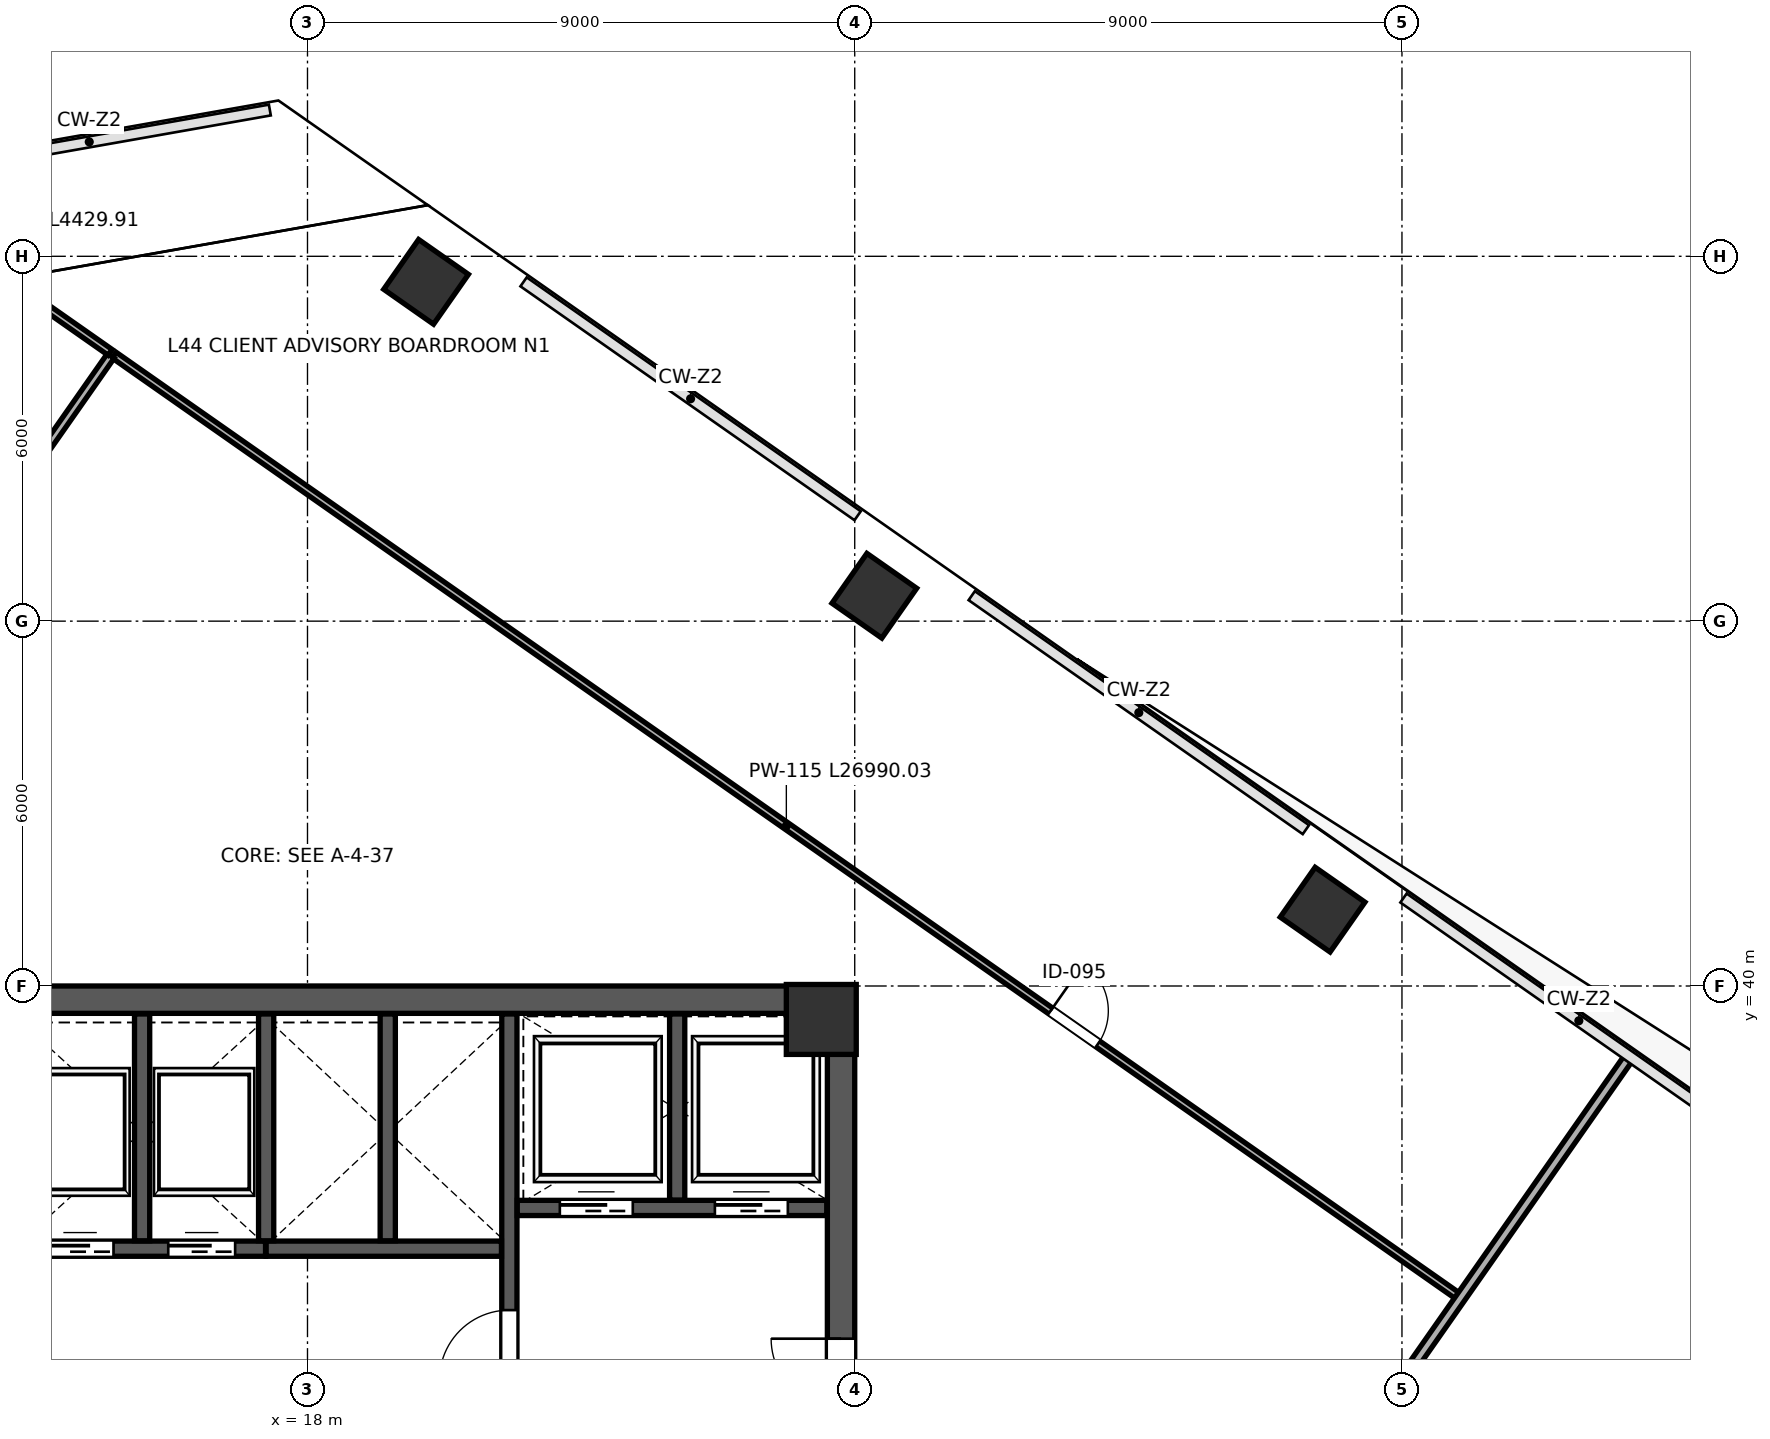
"""IFC4 building model, lengths in metres.
Left out: names, types, materials, properties, quantities, classifications, styles, units other than length and angle.
Written with IfcOpenShell. Run it as: python <this file> out.ifc"""

import sys

from ifc_helpers import new_model, si_unit, direction, frame, frame_2d, origin, origin_2d, place, context, subcontext, project, spatial, rectangle, extrude, clip, halfspace, source, transform, mapped, element, fill, save


model = new_model("IFC4")
c1 = context("Model", 3, precision=1e-05, world=origin(), true_north=direction((0.0, 1.0)))
c2 = subcontext(c1, "Body", "Model", "MODEL_VIEW")
j1 = project(units=[si_unit("LENGTHUNIT", "METRE"), si_unit("PLANEANGLEUNIT", "RADIAN")], contexts=[c1])
p1 = place(None, origin())
s1 = spatial("IfcSite", under=j1, at=p1, CompositionType="ELEMENT")
p2 = place(p1, origin())
s2 = spatial("IfcBuilding", under=s1, at=p2, CompositionType="ELEMENT")
p3 = place(p2, frame((0.0, 0.0, 196.0)))
s3 = spatial("IfcBuildingStorey", under=s2, at=p3, CompositionType="ELEMENT", Elevation=196.0)
m1 = source(origin(), c2, "Body", "SweptSolid", [
    extrude(rectangle(XDim=1.15, YDim=1.15, at=origin_2d()), origin(), (0.0, 0.0, 1.0), 4.198),
])
p4 = place(p3, frame((26.45, 39.45, 0.001), z_axis=(0.0, 0.0, 1.0), x_axis=(1.0, 0.0, 0.0)))
e1 = element("IfcColumn", 1, at=p4, inside=s3, PredefinedType="COLUMN", context=c2, shape_type="MappedRepresentation", body=[
    mapped(m1, transform((0.0, 0.0, 0.0), scale=1.0)),
])
p5 = place(p3, frame((19.95, 51.58, 0.0), z_axis=(0.101258987267, 0.006881678746, 0.994836298089), x_axis=(-0.513759043576, -0.855957245093, 0.058213741642)))
e2 = element("IfcColumn", 2, at=p5, inside=s3, PredefinedType="COLUMN", context=c2, shape_type="Clipping", body=[
    clip(clip(extrude(rectangle(XDim=1.0, YDim=1.0, at=origin_2d()), origin(), (0.0, 0.0, 1.0), 4.222), halfspace(frame((0.0, 0.0, 0.072), z_axis=(0.0, 0.0, -1.0), x_axis=(1.0, 0.0, 0.0)), False)), halfspace(frame((0.0, 0.0, 4.15), z_axis=(0.0, 0.0, 1.0), x_axis=(1.0, 0.0, 0.0)), False)),
])
p6 = place(p3, frame((27.323, 46.418, 0.0), z_axis=(0.074280101089, -0.030998326117, 0.996755521861), x_axis=(-0.84309265883, -0.535783006939, 0.04616641748)))
e3 = element("IfcColumn", 3, at=p6, inside=s3, PredefinedType="COLUMN", context=c2, shape_type="Clipping", body=[
    clip(clip(extrude(rectangle(XDim=1.0, YDim=1.0, at=origin_2d()), origin(), (0.0, 0.0, 1.0), 4.214), halfspace(frame((0.0, 0.0, 0.057), z_axis=(0.0, 0.0, -1.0), x_axis=(1.0, 0.0, 0.0)), False)), halfspace(frame((0.0, 0.0, 4.157), z_axis=(0.0, 0.0, 1.0), x_axis=(1.0, 0.0, 0.0)), False)),
])
p7 = place(p3, frame((34.695, 41.256, 0.0), z_axis=(0.047152209171, -0.068874664255, 0.996510386195), x_axis=(-0.998813718494, 0.008891928964, 0.047875769947)))
e4 = element("IfcColumn", 4, at=p7, inside=s3, PredefinedType="COLUMN", context=c2, shape_type="Clipping", body=[
    clip(clip(extrude(rectangle(XDim=1.0, YDim=1.0, at=origin_2d()), origin(), (0.0, 0.0, 1.0), 4.215), halfspace(frame((0.0, 0.0, 0.059), z_axis=(0.0, 0.0, -1.0), x_axis=(1.0, 0.0, 0.0)), False)), halfspace(frame((0.0, 0.0, 4.156), z_axis=(0.0, 0.0, 1.0), x_axis=(1.0, 0.0, 0.0)), False)),
])
p8 = place(p3, frame((26.775, 24.45, 0.0), z_axis=(0.0, 0.0, 1.0), x_axis=(0.0, 1.0, 0.0)))
e5 = element("IfcWall", 5, at=p8, inside=s3, PredefinedType="SHEAR", context=c2, shape_type="SweptSolid", body=[
    extrude(rectangle(XDim=15.1, YDim=0.45, at=frame_2d((7.55, 0.0))), origin(), (0.0, 0.0, 1.0), 3.96),
])
p9 = place(p8, frame((8.6, 0.0, 0.0)))
e6 = element("IfcOpeningElement", 6, at=p9, cuts=e5, PredefinedType="OPENING", context=c2, shape_type="SweptSolid", body=[
    extrude(rectangle(XDim=1.15, YDim=2.2, at=frame_2d((0.575, 1.1))), frame((0.0, 0.235, 0.0), z_axis=(0.0, -1.0, 0.0), x_axis=(1.0, 0.0, 0.0)), (0.0, 0.0, 1.0), 0.47),
])
p10 = place(p3, frame((9.0, 39.775, 0.0), z_axis=(0.0, 0.0, 1.0), x_axis=(1.0, 0.0, 0.0)))
e7 = element("IfcWall", 7, at=p10, inside=s3, PredefinedType="SHEAR", context=c2, shape_type="SweptSolid", body=[
    extrude(rectangle(XDim=18.0, YDim=0.45, at=frame_2d((9.0, 0.0))), origin(), (0.0, 0.0, 1.0), 3.96),
])
p11 = place(p3, frame((21.32, 32.12, 0.0), z_axis=(0.0, 0.0, 1.0), x_axis=(0.0, 1.0, 0.0)))
e8 = element("IfcWall", 8, at=p11, inside=s3, PredefinedType="SHEAR", context=c2, shape_type="SweptSolid", body=[
    extrude(rectangle(XDim=7.42, YDim=0.25, at=frame_2d((3.71, 0.0))), origin(), (0.0, 0.0, 1.0), 3.96),
])
p12 = place(p11, frame((1.4, 0.0, 0.0)))
e9 = element("IfcOpeningElement", 9, at=p12, cuts=e8, PredefinedType="OPENING", context=c2, shape_type="SweptSolid", body=[
    extrude(rectangle(XDim=1.15, YDim=2.2, at=frame_2d((0.575, 1.1))), frame((0.0, 0.135, 0.0), z_axis=(0.0, -1.0, 0.0), x_axis=(1.0, 0.0, 0.0)), (0.0, 0.0, 1.0), 0.27),
])
p13 = place(p3, frame((21.45, 36.35, 0.0), z_axis=(0.0, 0.0, 1.0), x_axis=(1.0, 0.0, 0.0)))
e10 = element("IfcWall", 10, at=p13, inside=s3, PredefinedType="SHEAR", context=c2, shape_type="SweptSolid", body=[
    extrude(rectangle(XDim=5.09, YDim=0.25, at=frame_2d((2.545, 0.0))), origin(), (0.0, 0.0, 1.0), 3.96),
])
p14 = place(p13, frame((0.7, 0.0, 0.0)))
e11 = element("IfcOpeningElement", 11, at=p14, cuts=e10, PredefinedType="OPENING", context=c2, shape_type="SweptSolid", body=[
    extrude(rectangle(XDim=1.2, YDim=2.2, at=frame_2d((0.6, 1.1))), frame((0.0, 0.135, 0.0), z_axis=(0.0, -1.0, 0.0), x_axis=(1.0, 0.0, 0.0)), (0.0, 0.0, 1.0), 0.27),
])
p15 = place(p13, frame((3.25, 0.0, 0.0)))
e12 = element("IfcOpeningElement", 12, at=p15, cuts=e10, PredefinedType="OPENING", context=c2, shape_type="SweptSolid", body=[
    extrude(rectangle(XDim=1.2, YDim=2.2, at=frame_2d((0.6, 1.1))), frame((0.0, 0.135, 0.0), z_axis=(0.0, -1.0, 0.0), x_axis=(1.0, 0.0, 0.0)), (0.0, 0.0, 1.0), 0.27),
])
p16 = place(p3, frame((24.08, 36.48, 0.0), z_axis=(0.0, 0.0, 1.0), x_axis=(0.0, 1.0, 0.0)))
e13 = element("IfcWall", 13, at=p16, inside=s3, PredefinedType="SHEAR", context=c2, shape_type="SweptSolid", body=[
    extrude(rectangle(XDim=3.06, YDim=0.25, at=frame_2d((1.53, 0.0))), origin(), (0.0, 0.0, 1.0), 3.96),
])
p17 = place(p3, frame((13.06, 35.68, 0.0), z_axis=(0.0, 0.0, 1.0), x_axis=(1.0, 0.0, 0.0)))
e14 = element("IfcWall", 14, at=p17, inside=s3, PredefinedType="SHEAR", context=c2, shape_type="SweptSolid", body=[
    extrude(rectangle(XDim=4.25, YDim=0.25, at=frame_2d((2.125, 0.0))), origin(), (0.0, 0.0, 1.0), 3.96),
])
p18 = place(p17, frame((0.65, 0.0, 0.0)))
e15 = element("IfcOpeningElement", 15, at=p18, cuts=e14, PredefinedType="OPENING", context=c2, shape_type="SweptSolid", body=[
    extrude(rectangle(XDim=1.1, YDim=2.2, at=frame_2d((0.55, 1.1))), frame((0.0, 0.135, 0.0), z_axis=(0.0, -1.0, 0.0), x_axis=(1.0, 0.0, 0.0)), (0.0, 0.0, 1.0), 0.27),
])
p19 = place(p17, frame((2.65, 0.0, 0.0)))
e16 = element("IfcOpeningElement", 16, at=p19, cuts=e14, PredefinedType="OPENING", context=c2, shape_type="SweptSolid", body=[
    extrude(rectangle(XDim=1.1, YDim=2.2, at=frame_2d((0.55, 1.1))), frame((0.0, 0.135, 0.0), z_axis=(0.0, -1.0, 0.0), x_axis=(1.0, 0.0, 0.0)), (0.0, 0.0, 1.0), 0.27),
])
p20 = place(p3, frame((15.28, 35.81, 0.0), z_axis=(0.0, 0.0, 1.0), x_axis=(0.0, 1.0, 0.0)))
e17 = element("IfcWall", 17, at=p20, inside=s3, PredefinedType="SHEAR", context=c2, shape_type="SweptSolid", body=[
    extrude(rectangle(XDim=3.73, YDim=0.25, at=frame_2d((1.865, 0.0))), origin(), (0.0, 0.0, 1.0), 3.96),
])
p21 = place(p3, frame((17.32, 35.68, 0.0), z_axis=(0.0, 0.0, 1.0), x_axis=(1.0, 0.0, 0.0)))
e18 = element("IfcWall", 18, at=p21, inside=s3, PredefinedType="SHEAR", context=c2, shape_type="SweptSolid", body=[
    extrude(rectangle(XDim=3.87, YDim=0.25, at=frame_2d((1.935, 0.0))), origin(), (0.0, 0.0, 1.0), 3.96),
])
for number, where, z_axis, x_axis in (
    (19, (17.32, 35.81, 0.0), (0.0, 0.0, 1.0), (0.0, 1.0, 0.0)),
    (20, (19.32, 35.81, 0.0), (0.0, 0.0, 1.0), (0.0, 1.0, 0.0)),
):
    element("IfcWall", number, at=place(p3, frame(where, z_axis=z_axis, x_axis=x_axis)), inside=s3, PredefinedType="SHEAR", context=c2, shape_type="SweptSolid", body=[
        extrude(rectangle(XDim=3.73, YDim=0.25, at=frame_2d((1.865, 0.0))), origin(), (0.0, 0.0, 1.0), 3.96),
    ])
p22 = place(p3, frame((14.821, 50.374, 0.0), z_axis=(0.0, 0.0, 1.0), x_axis=(0.819153719849, -0.573574043396, 0.0)))
e21 = element("IfcWall", 21, at=p22, inside=s3, PredefinedType="PARTITIONING", context=c2, shape_type="SweptSolid", body=[
    extrude(rectangle(XDim=26.99, YDim=0.115, at=frame_2d((13.495, 0.0))), origin(), (0.0, 0.0, 1.0), 3.96),
])
p23 = place(p22, frame((18.8, 0.0, 0.0)))
e22 = element("IfcOpeningElement", 22, at=p23, cuts=e21, PredefinedType="OPENING", context=c2, shape_type="SweptSolid", body=[
    extrude(rectangle(XDim=0.95, YDim=2.15, at=frame_2d((0.475, 1.075))), frame((0.0, 0.067, 0.0), z_axis=(0.0, -1.0, 0.0), x_axis=(1.0, 0.0, 0.0)), (0.0, 0.0, 1.0), 0.135),
])
p24 = place(p3, frame((1.189, 30.975, 0.0), z_axis=(0.0, 0.0, 1.0), x_axis=(0.573571020786, 0.819155836282, 0.0)))
e23 = element("IfcWall", 23, at=p24, inside=s3, PredefinedType="PARTITIONING", context=c2, shape_type="SweptSolid", body=[
    extrude(rectangle(XDim=23.67, YDim=0.135, at=frame_2d((11.835, 0.0))), origin(), (0.0, 0.0, 1.0), 3.96),
])
p25 = place(p24, frame((6.6, 0.0, 0.0)))
e24 = element("IfcOpeningElement", 24, at=p25, cuts=e23, PredefinedType="OPENING", context=c2, shape_type="SweptSolid", body=[
    extrude(rectangle(XDim=0.95, YDim=2.15, at=frame_2d((0.475, 1.075))), frame((0.0, 0.078, 0.0), z_axis=(0.0, -1.0, 0.0), x_axis=(1.0, 0.0, 0.0)), (0.0, 0.0, 1.0), 0.155),
])
p26 = place(p3, frame((11.127, 52.961, 0.0), z_axis=(0.0, 0.0, 1.0), x_axis=(0.819130930641, -0.573606588584, 0.0)))
e25 = element("IfcWall", 25, at=p26, inside=s3, PredefinedType="PARTITIONING", context=c2, shape_type="SweptSolid", body=[
    extrude(rectangle(XDim=4.43, YDim=0.115, at=frame_2d((2.215, 0.0))), origin(), (0.0, 0.0, 1.0), 3.96),
])
p27 = place(p3, frame((28.336, 22.55, 0.0), z_axis=(0.0, 0.0, 1.0), x_axis=(0.573581263398, 0.819148664333, 0.0)))
e26 = element("IfcWall", 26, at=p27, inside=s3, PredefinedType="PARTITIONING", context=c2, shape_type="SweptSolid", body=[
    extrude(rectangle(XDim=19.84, YDim=0.16, at=frame_2d((9.92, 0.0))), origin(), (0.0, 0.0, 1.0), 3.195),
])
m2 = source(origin(), c2, "Body", "SweptSolid", [
    extrude(rectangle(XDim=1.15, YDim=2.2, at=frame_2d((0.575, 1.1))), frame((0.0, 0.025, 0.0), z_axis=(0.0, -1.0, 0.0), x_axis=(1.0, 0.0, 0.0)), (0.0, 0.0, 1.0), 0.05),
])
p28 = place(p12, origin())
e27 = element("IfcDoor", 27, at=p28, inside=s3, OperationType="SINGLE_SWING_LEFT", PredefinedType="DOOR", context=c2, shape_type="MappedRepresentation", body=[
    mapped(m2, transform((0.0, 0.0, 0.0), scale=1.0)),
])
fill(e9, e27)
p29 = place(p9, origin())
e28 = element("IfcDoor", 28, at=p29, inside=s3, OperationType="SINGLE_SWING_RIGHT", PredefinedType="DOOR", context=c2, shape_type="MappedRepresentation", body=[
    mapped(m2, transform((0.0, 0.0, 0.0), scale=1.0)),
])
fill(e6, e28)
m3 = source(origin(), c2, "Body", "SweptSolid", [
    extrude(rectangle(XDim=1.1, YDim=2.2, at=frame_2d((0.55, 1.1))), frame((0.0, 0.025, 0.0), z_axis=(0.0, -1.0, 0.0), x_axis=(1.0, 0.0, 0.0)), (0.0, 0.0, 1.0), 0.05),
])
p30 = place(p18, origin())
e29 = element("IfcDoor", 29, at=p30, inside=s3, OperationType="SLIDING_TO_LEFT", PredefinedType="DOOR", context=c2, shape_type="MappedRepresentation", body=[
    mapped(m3, transform((0.0, 0.0, 0.0), scale=1.0)),
])
fill(e15, e29)
p31 = place(p19, origin())
e30 = element("IfcDoor", 30, at=p31, inside=s3, OperationType="SLIDING_TO_RIGHT", PredefinedType="DOOR", context=c2, shape_type="MappedRepresentation", body=[
    mapped(m3, transform((0.0, 0.0, 0.0), scale=1.0)),
])
fill(e16, e30)
m4 = source(origin(), c2, "Body", "SweptSolid", [
    extrude(rectangle(XDim=1.2, YDim=2.2, at=frame_2d((0.6, 1.1))), frame((0.0, 0.025, 0.0), z_axis=(0.0, -1.0, 0.0), x_axis=(1.0, 0.0, 0.0)), (0.0, 0.0, 1.0), 0.05),
])
p32 = place(p14, origin())
e31 = element("IfcDoor", 31, at=p32, inside=s3, OperationType="SLIDING_TO_LEFT", PredefinedType="DOOR", context=c2, shape_type="MappedRepresentation", body=[
    mapped(m4, transform((0.0, 0.0, 0.0), scale=1.0)),
])
fill(e11, e31)
p33 = place(p15, origin())
e32 = element("IfcDoor", 32, at=p33, inside=s3, OperationType="SLIDING_TO_RIGHT", PredefinedType="DOOR", context=c2, shape_type="MappedRepresentation", body=[
    mapped(m4, transform((0.0, 0.0, 0.0), scale=1.0)),
])
fill(e12, e32)
m5 = source(origin(), c2, "Body", "SweptSolid", [
    extrude(rectangle(XDim=0.95, YDim=2.15, at=frame_2d((0.475, 1.075))), frame((0.0, 0.025, 0.0), z_axis=(0.0, -1.0, 0.0), x_axis=(1.0, 0.0, 0.0)), (0.0, 0.0, 1.0), 0.05),
])
p34 = place(p23, origin())
e33 = element("IfcDoor", 33, at=p34, inside=s3, OperationType="SINGLE_SWING_LEFT", PredefinedType="DOOR", context=c2, shape_type="MappedRepresentation", body=[
    mapped(m5, transform((0.0, 0.0, 0.0), scale=1.0)),
])
fill(e22, e33)
save(model, sys.argv[1])
